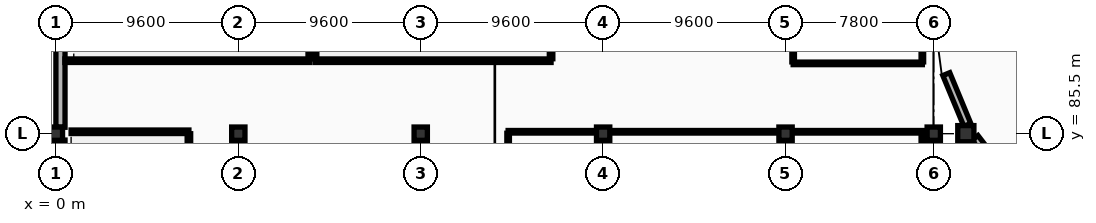
"""IFC4 building model, lengths in metres.
Left out: names, types, materials, properties, quantities, classifications, styles, units other than length and angle.
Written with IfcOpenShell. Run it as: python <this file> out.ifc"""

import sys

from ifc_helpers import new_model, si_unit, direction, frame, frame_2d, origin, origin_2d, place, context, subcontext, project, spatial, rectangle, circle, extrude, element, fill, save


model = new_model("IFC4")
c1 = context("Model", 3, precision=1e-05, world=origin(), true_north=direction((0.0, 1.0)))
c2 = subcontext(c1, "Body", "Model", "MODEL_VIEW")
j1 = project(units=[si_unit("LENGTHUNIT", "METRE"), si_unit("PLANEANGLEUNIT", "RADIAN")], contexts=[c1])
p1 = place(None, origin())
s1 = spatial("IfcSite", under=j1, at=p1, CompositionType="ELEMENT")
p2 = place(p1, origin())
s2 = spatial("IfcBuilding", under=s1, at=p2, CompositionType="ELEMENT")
p3 = place(p2, frame((0.0, 0.0, 5.4)))
s3 = spatial("IfcBuildingStorey", under=s2, at=p3, CompositionType="ELEMENT", Elevation=5.4)
p4 = place(p3, frame((47.888, 85.5, 0.0), z_axis=(0.0, 0.0, 1.0), x_axis=(1.0, 0.0, 0.0)))
e1 = element("IfcColumn", 1, at=p4, inside=s3, PredefinedType="COLUMN", context=c2, shape_type="SweptSolid", body=[
    extrude(circle(Radius=0.425, at=origin_2d()), origin(), (0.0, 0.0, 1.0), 4.5),
])
for number, where, z_axis, x_axis in (
    (2, (0.0, 85.5, 0.0), (0.0, 0.0, 1.0), (1.0, 0.0, 0.0)),
    (3, (9.6, 85.5, 0.0), (0.0, 0.0, 1.0), (1.0, 0.0, 0.0)),
    (4, (19.2, 85.5, 0.0), (0.0, 0.0, 1.0), (1.0, 0.0, 0.0)),
    (5, (28.8, 85.5, 0.0), (0.0, 0.0, 1.0), (1.0, 0.0, 0.0)),
    (6, (38.4, 85.5, 0.0), (0.0, 0.0, 1.0), (1.0, 0.0, 0.0)),
    (7, (46.2, 85.5, 0.0), (0.0, 0.0, 1.0), (1.0, 0.0, 0.0)),
):
    element("IfcColumn", number, at=place(p3, frame(where, z_axis=z_axis, x_axis=x_axis)), inside=s3, PredefinedType="COLUMN", context=c2, shape_type="SweptSolid", body=[
        extrude(rectangle(XDim=0.7, YDim=0.7, at=origin_2d()), origin(), (0.0, 0.0, 1.0), 4.5),
    ])
p5 = place(p3, frame((46.86, 88.635, 0.0), z_axis=(0.0, 0.0, 1.0), x_axis=(0.382642547526, -0.923896466506, 0.0)))
e8 = element("IfcWall", 8, at=p5, inside=s3, PredefinedType="ELEMENTEDWALL", context=c2, shape_type="SweptSolid", body=[
    extrude(rectangle(XDim=2.892, YDim=0.395, at=frame_2d((1.446, 0.0))), origin(), (0.0, 0.0, 1.0), 3.37),
])
p6 = place(p5, frame((0.962, 0.0, 0.85)))
e9 = element("IfcOpeningElement", 9, at=p6, cuts=e8, PredefinedType="OPENING", context=c2, shape_type="SweptSolid", body=[
    extrude(rectangle(XDim=0.9, YDim=1.85, at=frame_2d((0.45, 0.925))), frame((0.0, 0.208, 0.0), z_axis=(0.0, -1.0, 0.0), x_axis=(1.0, 0.0, 0.0)), (0.0, 0.0, 1.0), 0.415),
])
p7 = place(p3, frame((48.369, 85.283, 0.0), z_axis=(0.0, 0.0, 1.0), x_axis=(0.608787157184, -0.793333597705, 0.0)))
e10 = element("IfcWall", 10, at=p7, inside=s3, PredefinedType="ELEMENTEDWALL", context=c2, shape_type="SweptSolid", body=[
    extrude(rectangle(XDim=2.824, YDim=0.395, at=frame_2d((1.412, 0.0))), origin(), (0.0, 0.0, 1.0), 3.37),
])
p8 = place(p7, frame((0.962, 0.0, 0.85)))
e11 = element("IfcOpeningElement", 11, at=p8, cuts=e10, PredefinedType="OPENING", context=c2, shape_type="SweptSolid", body=[
    extrude(rectangle(XDim=0.9, YDim=1.85, at=frame_2d((0.45, 0.925))), frame((0.0, 0.208, 0.0), z_axis=(0.0, -1.0, 0.0), x_axis=(1.0, 0.0, 0.0)), (0.0, 0.0, 1.0), 0.415),
])
p9 = place(p3, frame((0.24, 74.742, 0.0), z_axis=(0.0, 0.0, 1.0), x_axis=(0.0, 1.0, 0.0)))
e12 = element("IfcWall", 12, at=p9, inside=s3, PredefinedType="STANDARD", context=c2, shape_type="SweptSolid", body=[
    extrude(rectangle(XDim=10.421, YDim=0.48, at=frame_2d((5.21, 0.0))), origin(), (0.0, 0.0, 1.0), 3.33),
])
p10 = place(p9, frame((1.345, 0.0, 0.85)))
e13 = element("IfcOpeningElement", 13, at=p10, cuts=e12, PredefinedType="OPENING", context=c2, shape_type="SweptSolid", body=[
    extrude(rectangle(XDim=1.7, YDim=2.3, at=frame_2d((0.85, 1.15))), frame((0.0, 0.25, 0.0), z_axis=(0.0, -1.0, 0.0), x_axis=(1.0, 0.0, 0.0)), (0.0, 0.0, 1.0), 0.5),
])
p11 = place(p9, frame((4.358, 0.0, 0.85)))
e14 = element("IfcOpeningElement", 14, at=p11, cuts=e12, PredefinedType="OPENING", context=c2, shape_type="SweptSolid", body=[
    extrude(rectangle(XDim=1.7, YDim=2.3, at=frame_2d((0.85, 1.15))), frame((0.0, 0.25, 0.0), z_axis=(0.0, -1.0, 0.0), x_axis=(1.0, 0.0, 0.0)), (0.0, 0.0, 1.0), 0.5),
])
p12 = place(p9, frame((7.371, 0.0, 0.85)))
e15 = element("IfcOpeningElement", 15, at=p12, cuts=e12, PredefinedType="OPENING", context=c2, shape_type="SweptSolid", body=[
    extrude(rectangle(XDim=1.7, YDim=2.3, at=frame_2d((0.85, 1.15))), frame((0.0, 0.25, 0.0), z_axis=(0.0, -1.0, 0.0), x_axis=(1.0, 0.0, 0.0)), (0.0, 0.0, 1.0), 0.5),
])
p13 = place(p3, frame((0.24, 85.837, 0.0), z_axis=(0.0, 0.0, 1.0), x_axis=(0.0, 1.0, 0.0)))
e16 = element("IfcWall", 16, at=p13, inside=s3, PredefinedType="STANDARD", context=c2, shape_type="SweptSolid", body=[
    extrude(rectangle(XDim=11.921, YDim=0.48, at=frame_2d((5.96, 0.0))), origin(), (0.0, 0.0, 1.0), 3.28),
])
p14 = place(p13, frame((5.113, 0.0, 0.76)))
e17 = element("IfcOpeningElement", 17, at=p14, cuts=e16, PredefinedType="OPENING", context=c2, shape_type="SweptSolid", body=[
    extrude(rectangle(XDim=1.7, YDim=2.3, at=frame_2d((0.85, 1.15))), frame((0.0, 0.25, 0.0), z_axis=(0.0, -1.0, 0.0), x_axis=(1.0, 0.0, 0.0)), (0.0, 0.0, 1.0), 0.5),
])
p15 = place(p13, frame((8.626, 0.0, 0.76)))
e18 = element("IfcOpeningElement", 18, at=p15, cuts=e16, PredefinedType="OPENING", context=c2, shape_type="SweptSolid", body=[
    extrude(rectangle(XDim=1.7, YDim=2.3, at=frame_2d((0.85, 1.15))), frame((0.0, 0.25, 0.0), z_axis=(0.0, -1.0, 0.0), x_axis=(1.0, 0.0, 0.0)), (0.0, 0.0, 1.0), 0.5),
])
p16 = place(p3, frame((13.36, 89.34, 0.0), z_axis=(0.0, 0.0, 1.0), x_axis=(-1.0, 0.0, 0.0)))
e19 = element("IfcWall", 19, at=p16, inside=s3, PredefinedType="PARTITIONING", context=c2, shape_type="SweptSolid", body=[
    extrude(rectangle(XDim=12.886, YDim=0.185, at=frame_2d((6.443, 0.0))), origin(), (0.0, 0.0, 1.0), 3.33),
])
p17 = place(p16, frame((1.878, 0.0, 0.0)))
e20 = element("IfcOpeningElement", 20, at=p17, cuts=e19, PredefinedType="OPENING", context=c2, shape_type="SweptSolid", body=[
    extrude(rectangle(XDim=2.0, YDim=2.5, at=frame_2d((1.0, 1.25))), frame((0.0, 0.103, 0.0), z_axis=(0.0, -1.0, 0.0), x_axis=(1.0, 0.0, 0.0)), (0.0, 0.0, 1.0), 0.205),
])
p18 = place(p3, frame((13.36, 112.326, 0.0), z_axis=(0.0, 0.0, 1.0), x_axis=(0.0, -1.0, 0.0)))
e21 = element("IfcWall", 21, at=p18, inside=s3, PredefinedType="PARTITIONING", context=c2, shape_type="SweptSolid", body=[
    extrude(rectangle(XDim=22.884, YDim=0.185, at=frame_2d((11.442, 0.0))), origin(), (0.0, 0.0, 1.0), 3.43),
])
p19 = place(p3, frame((26.06, 89.34, 0.0), z_axis=(0.0, 0.0, 1.0), x_axis=(-1.0, 0.0, 0.0)))
e22 = element("IfcWall", 22, at=p19, inside=s3, PredefinedType="PARTITIONING", context=c2, shape_type="SweptSolid", body=[
    extrude(rectangle(XDim=12.42, YDim=0.185, at=frame_2d((6.21, 0.0))), origin(), (0.0, 0.0, 1.0), 3.33),
])
p20 = place(p19, frame((1.808, 0.0, 0.0)))
e23 = element("IfcOpeningElement", 23, at=p20, cuts=e22, PredefinedType="OPENING", context=c2, shape_type="SweptSolid", body=[
    extrude(rectangle(XDim=2.0, YDim=2.5, at=frame_2d((1.0, 1.25))), frame((0.0, 0.103, 0.0), z_axis=(0.0, -1.0, 0.0), x_axis=(1.0, 0.0, 0.0)), (0.0, 0.0, 1.0), 0.205),
])
for number, where, z_axis, x_axis in (
    (24, (13.64, 89.442, 0.0), (0.0, 0.0, 1.0), (0.0, 1.0, 0.0)),
    (25, (26.06, 97.597, 0.0), (0.0, 0.0, 1.0), (0.0, -1.0, 0.0)),
):
    element("IfcWall", number, at=place(p3, frame(where, z_axis=z_axis, x_axis=x_axis)), inside=s3, PredefinedType="PARTITIONING", context=c2, shape_type="SweptSolid", body=[
        extrude(rectangle(XDim=8.155, YDim=0.185, at=frame_2d((4.078, 0.0))), origin(), (0.0, 0.0, 1.0), 3.58),
    ])
p21 = place(p3, frame((45.6, 89.2, 0.0), z_axis=(0.0, 0.0, 1.0), x_axis=(-1.0, 0.0, 0.0)))
e26 = element("IfcWall", 26, at=p21, inside=s3, PredefinedType="PARTITIONING", context=c2, shape_type="SweptSolid", body=[
    extrude(rectangle(XDim=6.8, YDim=0.135, at=frame_2d((3.4, 0.0))), origin(), (0.0, 0.0, 1.0), 3.33),
])
p22 = place(p21, frame((2.153, 0.0, 0.0)))
e27 = element("IfcOpeningElement", 27, at=p22, cuts=e26, PredefinedType="OPENING", context=c2, shape_type="SweptSolid", body=[
    extrude(rectangle(XDim=0.95, YDim=2.15, at=frame_2d((0.475, 1.075))), frame((0.0, 0.077, 0.0), z_axis=(0.0, -1.0, 0.0), x_axis=(1.0, 0.0, 0.0)), (0.0, 0.0, 1.0), 0.155),
])
p23 = place(p3, frame((38.8, 89.278, 0.0), z_axis=(0.0, 0.0, 1.0), x_axis=(0.0, 1.0, 0.0)))
e28 = element("IfcWall", 28, at=p23, inside=s3, PredefinedType="PARTITIONING", context=c2, shape_type="SweptSolid", body=[
    extrude(rectangle(XDim=12.645, YDim=0.135, at=frame_2d((6.323, 0.0))), origin(), (0.0, 0.0, 1.0), 3.28),
])
p24 = place(p3, frame((45.6, 101.923, 0.0), z_axis=(0.0, 0.0, 1.0), x_axis=(0.0, -1.0, 0.0)))
e29 = element("IfcWall", 29, at=p24, inside=s3, PredefinedType="PARTITIONING", context=c2, shape_type="SweptSolid", body=[
    extrude(rectangle(XDim=12.645, YDim=0.135, at=frame_2d((6.323, 0.0))), origin(), (0.0, 0.0, 1.0), 3.57),
])
p25 = place(p3, frame((0.8, 85.6, 0.0), z_axis=(0.0, 0.0, 1.0), x_axis=(1.0, 0.0, 0.0)))
e30 = element("IfcWall", 30, at=p25, inside=s3, PredefinedType="PARTITIONING", context=c2, shape_type="SweptSolid", body=[
    extrude(rectangle(XDim=6.2, YDim=0.185, at=frame_2d((3.1, 0.0))), origin(), (0.0, 0.0, 1.0), 3.43),
])
p26 = place(p25, frame((2.1, 0.0, 0.0)))
e31 = element("IfcOpeningElement", 31, at=p26, cuts=e30, PredefinedType="OPENING", context=c2, shape_type="SweptSolid", body=[
    extrude(rectangle(XDim=2.0, YDim=2.5, at=frame_2d((1.0, 1.25))), frame((0.0, 0.103, 0.0), z_axis=(0.0, -1.0, 0.0), x_axis=(1.0, 0.0, 0.0)), (0.0, 0.0, 1.0), 0.205),
])
p27 = place(p3, frame((7.0, 85.498, 0.0), z_axis=(0.0, 0.0, 1.0), x_axis=(0.0, -1.0, 0.0)))
e32 = element("IfcWall", 32, at=p27, inside=s3, PredefinedType="PARTITIONING", context=c2, shape_type="SweptSolid", body=[
    extrude(rectangle(XDim=17.595, YDim=0.185, at=frame_2d((8.797, 0.0))), origin(), (0.0, 0.0, 1.0), 3.43),
])
p28 = place(p3, frame((23.8, 85.6, 0.0), z_axis=(0.0, 0.0, 1.0), x_axis=(1.0, 0.0, 0.0)))
e33 = element("IfcWall", 33, at=p28, inside=s3, PredefinedType="PARTITIONING", context=c2, shape_type="SweptSolid", body=[
    extrude(rectangle(XDim=21.8, YDim=0.135, at=frame_2d((10.9, 0.0))), origin(), (0.0, 0.0, 1.0), 3.33),
])
p29 = place(p28, frame((8.382, 0.0, 0.0)))
e34 = element("IfcOpeningElement", 34, at=p29, cuts=e33, PredefinedType="OPENING", context=c2, shape_type="SweptSolid", body=[
    extrude(rectangle(XDim=1.02, YDim=2.15, at=frame_2d((0.51, 1.075))), frame((0.0, 0.077, 0.0), z_axis=(0.0, -1.0, 0.0), x_axis=(1.0, 0.0, 0.0)), (0.0, 0.0, 1.0), 0.155),
])
p30 = place(p3, frame((23.8, 67.877, 0.0), z_axis=(0.0, 0.0, 1.0), x_axis=(0.0, 1.0, 0.0)))
e35 = element("IfcWall", 35, at=p30, inside=s3, PredefinedType="PARTITIONING", context=c2, shape_type="SweptSolid", body=[
    extrude(rectangle(XDim=17.645, YDim=0.135, at=frame_2d((8.823, 0.0))), origin(), (0.0, 0.0, 1.0), 3.43),
])
p31 = place(p3, frame((45.6, 85.522, 0.0), z_axis=(0.0, 0.0, 1.0), x_axis=(0.0, -1.0, 0.0)))
e36 = element("IfcWall", 36, at=p31, inside=s3, PredefinedType="PARTITIONING", context=c2, shape_type="SweptSolid", body=[
    extrude(rectangle(XDim=18.103, YDim=0.135, at=frame_2d((9.051, 0.0))), origin(), (0.0, 0.0, 1.0), 3.57),
])
p32 = place(p6, origin())
e37 = element("IfcWindow", 37, at=p32, inside=s3, PartitioningType="SINGLE_PANEL", PredefinedType="WINDOW", context=c2, shape_type="SweptSolid", body=[
    extrude(rectangle(XDim=0.9, YDim=1.85, at=frame_2d((0.45, 0.925))), frame((0.0, 0.03, 0.0), z_axis=(0.0, -1.0, 0.0), x_axis=(1.0, 0.0, 0.0)), (0.0, 0.0, 1.0), 0.06),
])
fill(e9, e37)
p33 = place(p17, origin())
e38 = element("IfcDoor", 38, at=p33, inside=s3, OperationType="DOUBLE_DOOR_SINGLE_SWING", PredefinedType="DOOR", context=c2, shape_type="SweptSolid", body=[
    extrude(rectangle(XDim=2.0, YDim=2.5, at=frame_2d((1.0, 1.25))), frame((0.0, 0.025, 0.0), z_axis=(0.0, -1.0, 0.0), x_axis=(1.0, 0.0, 0.0)), (0.0, 0.0, 1.0), 0.05),
])
fill(e20, e38)
p34 = place(p20, origin())
e39 = element("IfcDoor", 39, at=p34, inside=s3, OperationType="DOUBLE_DOOR_SINGLE_SWING", PredefinedType="DOOR", context=c2, shape_type="SweptSolid", body=[
    extrude(rectangle(XDim=2.0, YDim=2.5, at=frame_2d((1.0, 1.25))), frame((0.0, 0.025, 0.0), z_axis=(0.0, -1.0, 0.0), x_axis=(1.0, 0.0, 0.0)), (0.0, 0.0, 1.0), 0.05),
])
fill(e23, e39)
p35 = place(p22, origin())
e40 = element("IfcDoor", 40, at=p35, inside=s3, OperationType="SINGLE_SWING_RIGHT", PredefinedType="DOOR", context=c2, shape_type="SweptSolid", body=[
    extrude(rectangle(XDim=0.95, YDim=2.15, at=frame_2d((0.475, 1.075))), frame((0.0, 0.025, 0.0), z_axis=(0.0, -1.0, 0.0), x_axis=(1.0, 0.0, 0.0)), (0.0, 0.0, 1.0), 0.05),
])
fill(e27, e40)
p36 = place(p26, origin())
e41 = element("IfcDoor", 41, at=p36, inside=s3, OperationType="DOUBLE_DOOR_SINGLE_SWING", PredefinedType="DOOR", context=c2, shape_type="SweptSolid", body=[
    extrude(rectangle(XDim=2.0, YDim=2.5, at=frame_2d((1.0, 1.25))), frame((0.0, 0.025, 0.0), z_axis=(0.0, -1.0, 0.0), x_axis=(1.0, 0.0, 0.0)), (0.0, 0.0, 1.0), 0.05),
])
fill(e31, e41)
p37 = place(p29, origin())
e42 = element("IfcDoor", 42, at=p37, inside=s3, OperationType="SINGLE_SWING_LEFT", PredefinedType="DOOR", context=c2, shape_type="SweptSolid", body=[
    extrude(rectangle(XDim=1.02, YDim=2.15, at=frame_2d((0.51, 1.075))), frame((0.0, 0.025, 0.0), z_axis=(0.0, -1.0, 0.0), x_axis=(1.0, 0.0, 0.0)), (0.0, 0.0, 1.0), 0.05),
])
fill(e34, e42)
save(model, sys.argv[1])
